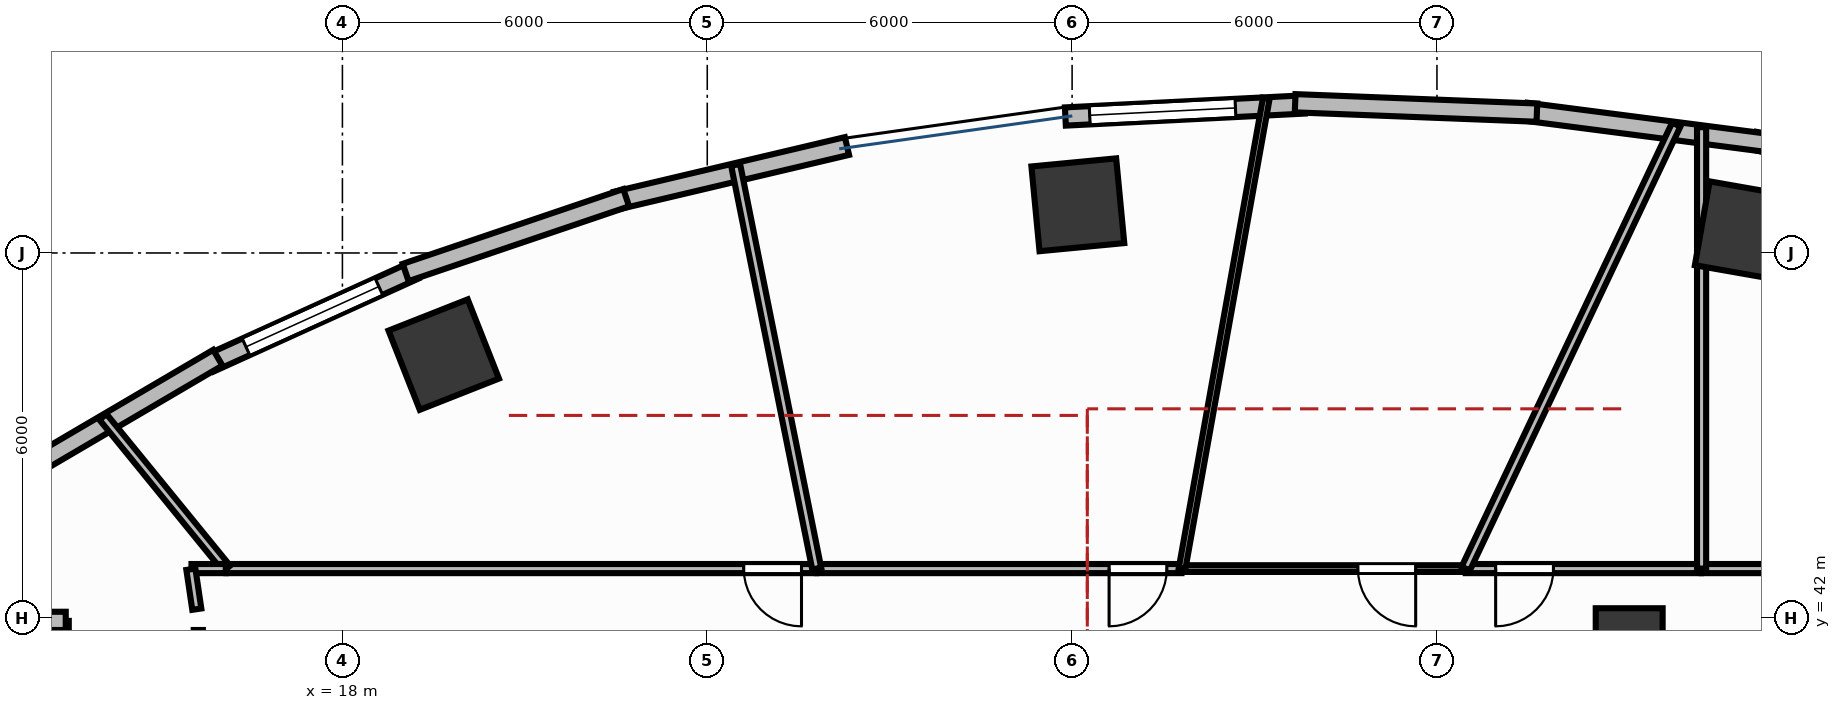
"""IFC4 building model, lengths in metres.
Left out: names, types, materials, properties, quantities, classifications, styles, units other than length and angle.
Written with IfcOpenShell. Run it as: python <this file> out.ifc"""

import sys

from ifc_helpers import new_model, si_unit, direction, frame, frame_2d, origin, origin_2d, place, context, subcontext, project, spatial, rectangle, extrude, element, fill, save


model = new_model("IFC4")
c1 = context("Model", 3, precision=1e-05, world=origin(), true_north=direction((0.0, 1.0)))
c2 = subcontext(c1, "Body", "Model", "MODEL_VIEW")
j1 = project(units=[si_unit("LENGTHUNIT", "METRE"), si_unit("PLANEANGLEUNIT", "RADIAN")], contexts=[c1])
p1 = place(None, origin())
s1 = spatial("IfcSite", under=j1, at=p1, CompositionType="ELEMENT")
p2 = place(p1, origin())
s2 = spatial("IfcBuilding", under=s1, at=p2, CompositionType="ELEMENT")
p3 = place(p2, frame((0.0, 0.0, 10.2)))
s3 = spatial("IfcBuildingStorey", under=s2, at=p3, CompositionType="ELEMENT", Elevation=10.2)
p4 = place(p3, frame((41.052, 48.367, -0.0), z_axis=(0.0, 0.0, 1.0), x_axis=(-0.984868307662, 0.173304404339, 0.0)))
e1 = element("IfcColumn", 1, at=p4, inside=s3, PredefinedType="COLUMN", context=c2, shape_type="SweptSolid", body=[
    extrude(rectangle(XDim=1.4, YDim=1.4, at=origin_2d()), origin(), (0.0, 0.0, 1.0), 4.451),
])
p5 = place(p3, frame((39.161, 41.608, -0.0), z_axis=(0.0, 0.0, 1.0), x_axis=(1.0, 0.0, 0.0)))
e2 = element("IfcColumn", 2, at=p5, inside=s3, PredefinedType="COLUMN", context=c2, shape_type="SweptSolid", body=[
    extrude(rectangle(XDim=1.1, YDim=1.1, at=origin_2d()), origin(), (0.0, 0.0, 1.0), 4.451),
])
for number, where, z_axis, x_axis in (
    (3, (30.094, 48.792, -0.0), (0.0, 0.0, 1.0), (0.995, 0.095, 0.0)),
    (4, (19.667, 46.329, -0.0), (0.0, 0.0, 1.0), (0.93, 0.367, 0.0)),
):
    element("IfcColumn", number, at=place(p3, frame(where, z_axis=z_axis, x_axis=x_axis)), inside=s3, PredefinedType="COLUMN", context=c2, shape_type="SweptSolid", body=[
        extrude(rectangle(XDim=1.4, YDim=1.4, at=origin_2d()), origin(), (0.0, 0.0, 1.0), 4.451),
    ])
p6 = place(p3, frame((33.821, 50.442, 0.0), z_axis=(0.0, 0.0, 1.0), x_axis=(-0.99873153138, -0.050352042933, 0.0)))
e5 = element("IfcWall", 5, at=p6, inside=s3, PredefinedType="STANDARD", context=c2, shape_type="SweptSolid", body=[
    extrude(rectangle(XDim=3.937, YDim=0.3, at=frame_2d((1.969, 0.0))), origin(), (0.0, 0.0, 1.0), 4.45),
])
p7 = place(p6, frame((1.136, 0.0, 1.5)))
e6 = element("IfcOpeningElement", 6, at=p7, cuts=e5, PredefinedType="OPENING", context=c2, shape_type="SweptSolid", body=[
    extrude(rectangle(XDim=2.4, YDim=1.2, at=frame_2d((1.2, 0.6))), frame((0.0, 0.165, 0.0), z_axis=(0.0, -1.0, 0.0), x_axis=(1.0, 0.0, 0.0)), (0.0, 0.0, 1.0), 0.33),
])
p8 = place(p3, frame((19.191, 47.717, 0.0), z_axis=(0.0, 0.0, 1.0), x_axis=(-0.910608120407, -0.413270917254, 0.0)))
e7 = element("IfcWall", 7, at=p8, inside=s3, PredefinedType="STANDARD", context=c2, shape_type="SweptSolid", body=[
    extrude(rectangle(XDim=3.7, YDim=0.3, at=frame_2d((1.85, 0.0))), origin(), (0.0, 0.0, 1.0), 4.45),
])
p9 = place(p8, frame((0.65, 0.0, 1.5)))
e8 = element("IfcOpeningElement", 8, at=p9, cuts=e7, PredefinedType="OPENING", context=c2, shape_type="SweptSolid", body=[
    extrude(rectangle(XDim=2.4, YDim=1.2, at=frame_2d((1.2, 0.6))), frame((0.0, 0.165, 0.0), z_axis=(0.0, -1.0, 0.0), x_axis=(1.0, 0.0, 0.0)), (0.0, 0.0, 1.0), 0.33),
])
p10 = place(p3, frame((45.04, 48.991, 0.0), z_axis=(0.0, 0.0, 1.0), x_axis=(-0.975868573345, 0.218358713032, 0.0)))
e9 = element("IfcWall", 9, at=p10, inside=s3, PredefinedType="STANDARD", context=c2, shape_type="SweptSolid", body=[
    extrude(rectangle(XDim=3.909, YDim=0.3, at=frame_2d((1.954, 0.0))), origin(), (0.0, 0.0, 1.0), 4.45),
])
p11 = place(p3, frame((41.395, 49.815, 0.0), z_axis=(0.0, 0.0, 1.0), x_axis=(-0.991734095036, 0.128310111617, 0.0)))
e10 = element("IfcWall", 10, at=p11, inside=s3, PredefinedType="STANDARD", context=c2, shape_type="SweptSolid", body=[
    extrude(rectangle(XDim=3.956, YDim=0.3, at=frame_2d((1.978, 0.0))), origin(), (0.0, 0.0, 1.0), 4.45),
])
p12 = place(p3, frame((37.644, 50.308, 0.0), z_axis=(0.0, 0.0, 1.0), x_axis=(-0.999245411623, 0.038840794937, 0.0)))
e11 = element("IfcWall", 11, at=p12, inside=s3, PredefinedType="STANDARD", context=c2, shape_type="SweptSolid", body=[
    extrude(rectangle(XDim=3.979, YDim=0.3, at=frame_2d((1.989, 0.0))), origin(), (0.0, 0.0, 1.0), 4.45),
])
p13 = place(p3, frame((26.297, 49.759, 0.0), z_axis=(0.0, 0.0, 1.0), x_axis=(-0.973197600754, -0.229970497863, 0.0)))
e12 = element("IfcWall", 12, at=p13, inside=s3, PredefinedType="STANDARD", context=c2, shape_type="SweptSolid", body=[
    extrude(rectangle(XDim=3.901, YDim=0.3, at=frame_2d((1.951, 0.0))), origin(), (0.0, 0.0, 1.0), 4.45),
])
p14 = place(p3, frame((22.667, 48.909, 0.0), z_axis=(0.0, 0.0, 1.0), x_axis=(-0.94702579403, -0.321157508773, 0.0)))
e13 = element("IfcWall", 13, at=p14, inside=s3, PredefinedType="STANDARD", context=c2, shape_type="SweptSolid", body=[
    extrude(rectangle(XDim=3.83, YDim=0.3, at=frame_2d((1.915, 0.0))), origin(), (0.0, 0.0, 1.0), 4.45),
])
p15 = place(p3, frame((15.951, 46.278, 0.0), z_axis=(0.0, 0.0, 1.0), x_axis=(-0.8624654944, -0.506115867139, 0.0)))
e14 = element("IfcWall", 14, at=p15, inside=s3, PredefinedType="STANDARD", context=c2, shape_type="SweptSolid", body=[
    extrude(rectangle(XDim=3.635, YDim=0.3, at=frame_2d((1.818, 0.0))), origin(), (0.0, 0.0, 1.0), 4.45),
])
p16 = place(p3, frame((13.35, 12.05, 0.0), z_axis=(0.0, 0.0, 1.0), x_axis=(0.0, 1.0, 0.0)))
e15 = element("IfcWall", 15, at=p16, inside=s3, PredefinedType="STANDARD", context=c2, shape_type="SweptSolid", body=[
    extrude(rectangle(XDim=29.9, YDim=0.3, at=frame_2d((14.95, 0.0))), origin(), (0.0, 0.0, 1.0), 4.45),
])
p17 = place(p3, frame((8.6, 41.95, 0.0), z_axis=(0.0, 0.0, 1.0), x_axis=(1.0, 0.0, 0.0)))
e16 = element("IfcWall", 16, at=p17, inside=s3, PredefinedType="STANDARD", context=c2, shape_type="SweptSolid", body=[
    extrude(rectangle(XDim=4.85, YDim=0.3, at=frame_2d((2.425, 0.0))), origin(), (0.0, 0.0, 1.0), 4.45),
])
p18 = place(p3, frame((43.2, 42.81, 0.0), z_axis=(0.0, 0.0, 1.0), x_axis=(-1.0, 0.0, 0.0)))
e17 = element("IfcWall", 17, at=p18, inside=s3, PredefinedType="PARTITIONING", context=c2, shape_type="SweptSolid", body=[
    extrude(rectangle(XDim=2.848, YDim=0.15, at=frame_2d((1.424, 0.0))), origin(), (0.0, 0.0, 1.0), 3.46),
])
p19 = place(p18, frame((0.639, 0.0, 0.0)))
e18 = element("IfcOpeningElement", 18, at=p19, cuts=e17, PredefinedType="OPENING", context=c2, shape_type="SweptSolid", body=[
    extrude(rectangle(XDim=0.95, YDim=2.15, at=frame_2d((0.475, 1.075))), frame((0.0, 0.09, 0.0), z_axis=(0.0, -1.0, 0.0), x_axis=(1.0, 0.0, 0.0)), (0.0, 0.0, 1.0), 0.18),
])
p20 = place(p3, frame((40.342, 42.81, 0.0), z_axis=(0.0, 0.0, 1.0), x_axis=(-1.0, 0.0, 0.0)))
e19 = element("IfcWall", 19, at=p20, inside=s3, PredefinedType="PARTITIONING", context=c2, shape_type="SweptSolid", body=[
    extrude(rectangle(XDim=3.869, YDim=0.15, at=frame_2d((1.934, 0.0))), origin(), (0.0, 0.0, 1.0), 3.46),
])
p21 = place(p20, frame((2.427, 0.0, 0.0)))
e20 = element("IfcOpeningElement", 20, at=p21, cuts=e19, PredefinedType="OPENING", context=c2, shape_type="SweptSolid", body=[
    extrude(rectangle(XDim=0.95, YDim=2.15, at=frame_2d((0.475, 1.075))), frame((0.0, 0.09, 0.0), z_axis=(0.0, -1.0, 0.0), x_axis=(1.0, 0.0, 0.0)), (0.0, 0.0, 1.0), 0.18),
])
p22 = place(p3, frame((36.463, 42.81, 0.0), z_axis=(0.0, 0.0, 1.0), x_axis=(-1.0, 0.0, 0.0)))
e21 = element("IfcWall", 21, at=p22, inside=s3, PredefinedType="MOVABLE", context=c2, shape_type="SweptSolid", body=[
    extrude(rectangle(XDim=4.655, YDim=0.11, at=frame_2d((2.328, 0.0))), origin(), (0.0, 0.0, 1.0), 3.46),
])
p23 = place(p22, frame((0.813, 0.0, 0.0)))
e22 = element("IfcOpeningElement", 22, at=p23, cuts=e21, PredefinedType="OPENING", context=c2, shape_type="SweptSolid", body=[
    extrude(rectangle(XDim=0.95, YDim=2.15, at=frame_2d((0.475, 1.075))), frame((0.0, 0.07, 0.0), z_axis=(0.0, -1.0, 0.0), x_axis=(1.0, 0.0, 0.0)), (0.0, 0.0, 1.0), 0.14),
])
p24 = place(p3, frame((31.798, 42.81, 0.0), z_axis=(0.0, 0.0, 1.0), x_axis=(-1.0, 0.0, 0.0)))
e23 = element("IfcWall", 23, at=p24, inside=s3, PredefinedType="PARTITIONING", context=c2, shape_type="SweptSolid", body=[
    extrude(rectangle(XDim=5.998, YDim=0.15, at=frame_2d((2.999, 0.0))), origin(), (0.0, 0.0, 1.0), 3.46),
])
p25 = place(p24, frame((0.24, 0.0, 0.0)))
e24 = element("IfcOpeningElement", 24, at=p25, cuts=e23, PredefinedType="OPENING", context=c2, shape_type="SweptSolid", body=[
    extrude(rectangle(XDim=0.95, YDim=2.15, at=frame_2d((0.475, 1.075))), frame((0.0, 0.09, 0.0), z_axis=(0.0, -1.0, 0.0), x_axis=(1.0, 0.0, 0.0)), (0.0, 0.0, 1.0), 0.18),
])
p26 = place(p3, frame((25.79, 42.81, 0.0), z_axis=(0.0, 0.0, 1.0), x_axis=(-1.0, 0.0, 0.0)))
e25 = element("IfcWall", 25, at=p26, inside=s3, PredefinedType="PARTITIONING", context=c2, shape_type="SweptSolid", body=[
    extrude(rectangle(XDim=9.695, YDim=0.15, at=frame_2d((4.847, 0.0))), origin(), (0.0, 0.0, 1.0), 3.46),
])
p27 = place(p26, frame((0.24, 0.0, 0.0)))
e26 = element("IfcOpeningElement", 26, at=p27, cuts=e25, PredefinedType="OPENING", context=c2, shape_type="SweptSolid", body=[
    extrude(rectangle(XDim=0.95, YDim=2.15, at=frame_2d((0.475, 1.075))), frame((0.0, 0.09, 0.0), z_axis=(0.0, -1.0, 0.0), x_axis=(1.0, 0.0, 0.0)), (0.0, 0.0, 1.0), 0.18),
])
p28 = place(p3, frame((40.352, 42.81, 0.0), z_axis=(0.0, 0.0, 1.0), x_axis=(0.0, 1.0, 0.0)))
e27 = element("IfcWall", 27, at=p28, inside=s3, PredefinedType="PARTITIONING", context=c2, shape_type="SweptSolid", body=[
    extrude(rectangle(XDim=7.259, YDim=0.15, at=frame_2d((3.629, 0.0))), origin(), (0.0, 0.0, 1.0), 3.46),
])
p29 = place(p3, frame((36.473, 42.81, 0.0), z_axis=(0.0, 0.0, 1.0), x_axis=(0.428481123873, 0.903550732657, 0.0)))
e28 = element("IfcWall", 28, at=p29, inside=s3, PredefinedType="PARTITIONING", context=c2, shape_type="SweptSolid", body=[
    extrude(rectangle(XDim=8.081, YDim=0.15, at=frame_2d((4.04, 0.0))), origin(), (0.0, 0.0, 1.0), 3.46),
])
p30 = place(p3, frame((31.808, 42.81, 0.0), z_axis=(0.0, 0.0, 1.0), x_axis=(0.176333699902, 0.984330445673, 0.0)))
e29 = element("IfcWall", 29, at=p30, inside=s3, PredefinedType="MOVABLE", context=c2, shape_type="SweptSolid", body=[
    extrude(rectangle(XDim=7.857, YDim=0.11, at=frame_2d((3.929, 0.0))), origin(), (0.0, 0.0, 1.0), 3.46),
])
p31 = place(p3, frame((25.8, 42.81, 0.0), z_axis=(0.0, 0.0, 1.0), x_axis=(-0.196920323658, 0.980419494977, 0.0)))
e30 = element("IfcWall", 30, at=p31, inside=s3, PredefinedType="PARTITIONING", context=c2, shape_type="SweptSolid", body=[
    extrude(rectangle(XDim=6.772, YDim=0.15, at=frame_2d((3.386, 0.0))), origin(), (0.0, 0.0, 1.0), 3.46),
])
p32 = place(p3, frame((16.095, 42.81, 0.0), z_axis=(0.0, 0.0, 1.0), x_axis=(-0.631654377787, 0.775250119008, 0.0)))
e31 = element("IfcWall", 31, at=p32, inside=s3, PredefinedType="PARTITIONING", context=c2, shape_type="SweptSolid", body=[
    extrude(rectangle(XDim=3.219, YDim=0.15, at=frame_2d((1.609, 0.0))), origin(), (0.0, 0.0, 1.0), 3.46),
])
p33 = place(p3, frame((16.082, 42.81, 0.0), z_axis=(0.0, 0.0, 1.0), x_axis=(-1.0, 0.0, 0.0)))
e32 = element("IfcWall", 32, at=p33, inside=s3, PredefinedType="PARTITIONING", context=c2, shape_type="SweptSolid", body=[
    extrude(rectangle(XDim=0.564, YDim=0.15, at=frame_2d((0.282, 0.0))), origin(), (0.0, 0.0, 1.0), 3.46),
])
p34 = place(p3, frame((15.508, 42.799, 0.0), z_axis=(0.0, 0.0, 1.0), x_axis=(0.146882189547, -0.989153993266, 0.0)))
e33 = element("IfcWall", 33, at=p34, inside=s3, PredefinedType="PARTITIONING", context=c2, shape_type="SweptSolid", body=[
    extrude(rectangle(XDim=0.663, YDim=0.15, at=frame_2d((0.332, 0.0))), origin(), (0.0, 0.0, 1.0), 3.46),
])
p35 = place(p7, origin())
e34 = element("IfcWindow", 34, at=p35, inside=s3, PartitioningType="DOUBLE_PANEL_HORIZONTAL", PredefinedType="WINDOW", context=c2, shape_type="SweptSolid", body=[
    extrude(rectangle(XDim=2.4, YDim=1.2, at=frame_2d((1.2, 0.6))), frame((0.0, 0.03, 0.0), z_axis=(0.0, -1.0, 0.0), x_axis=(1.0, 0.0, 0.0)), (0.0, 0.0, 1.0), 0.06),
])
fill(e6, e34)
p36 = place(p9, origin())
e35 = element("IfcWindow", 35, at=p36, inside=s3, PartitioningType="DOUBLE_PANEL_HORIZONTAL", PredefinedType="WINDOW", context=c2, shape_type="SweptSolid", body=[
    extrude(rectangle(XDim=2.4, YDim=1.2, at=frame_2d((1.2, 0.6))), frame((0.0, 0.03, 0.0), z_axis=(0.0, -1.0, 0.0), x_axis=(1.0, 0.0, 0.0)), (0.0, 0.0, 1.0), 0.06),
])
fill(e8, e35)
p37 = place(p21, origin())
e36 = element("IfcDoor", 36, at=p37, inside=s3, OperationType="SINGLE_SWING_RIGHT", PredefinedType="DOOR", context=c2, shape_type="SweptSolid", body=[
    extrude(rectangle(XDim=0.95, YDim=2.15, at=frame_2d((0.475, 1.075))), frame((0.0, 0.025, 0.0), z_axis=(0.0, -1.0, 0.0), x_axis=(1.0, 0.0, 0.0)), (0.0, 0.0, 1.0), 0.05),
])
fill(e20, e36)
p38 = place(p23, origin())
e37 = element("IfcDoor", 37, at=p38, inside=s3, OperationType="SINGLE_SWING_LEFT", PredefinedType="DOOR", context=c2, shape_type="SweptSolid", body=[
    extrude(rectangle(XDim=0.95, YDim=2.15, at=frame_2d((0.475, 1.075))), frame((0.0, 0.025, 0.0), z_axis=(0.0, -1.0, 0.0), x_axis=(1.0, 0.0, 0.0)), (0.0, 0.0, 1.0), 0.05),
])
fill(e22, e37)
p39 = place(p25, origin())
e38 = element("IfcDoor", 38, at=p39, inside=s3, OperationType="SINGLE_SWING_RIGHT", PredefinedType="DOOR", context=c2, shape_type="SweptSolid", body=[
    extrude(rectangle(XDim=0.95, YDim=2.15, at=frame_2d((0.475, 1.075))), frame((0.0, 0.025, 0.0), z_axis=(0.0, -1.0, 0.0), x_axis=(1.0, 0.0, 0.0)), (0.0, 0.0, 1.0), 0.05),
])
fill(e24, e38)
p40 = place(p27, origin())
e39 = element("IfcDoor", 39, at=p40, inside=s3, OperationType="SINGLE_SWING_LEFT", PredefinedType="DOOR", context=c2, shape_type="SweptSolid", body=[
    extrude(rectangle(XDim=0.95, YDim=2.15, at=frame_2d((0.475, 1.075))), frame((0.0, 0.025, 0.0), z_axis=(0.0, -1.0, 0.0), x_axis=(1.0, 0.0, 0.0)), (0.0, 0.0, 1.0), 0.05),
])
fill(e26, e39)
save(model, sys.argv[1])
